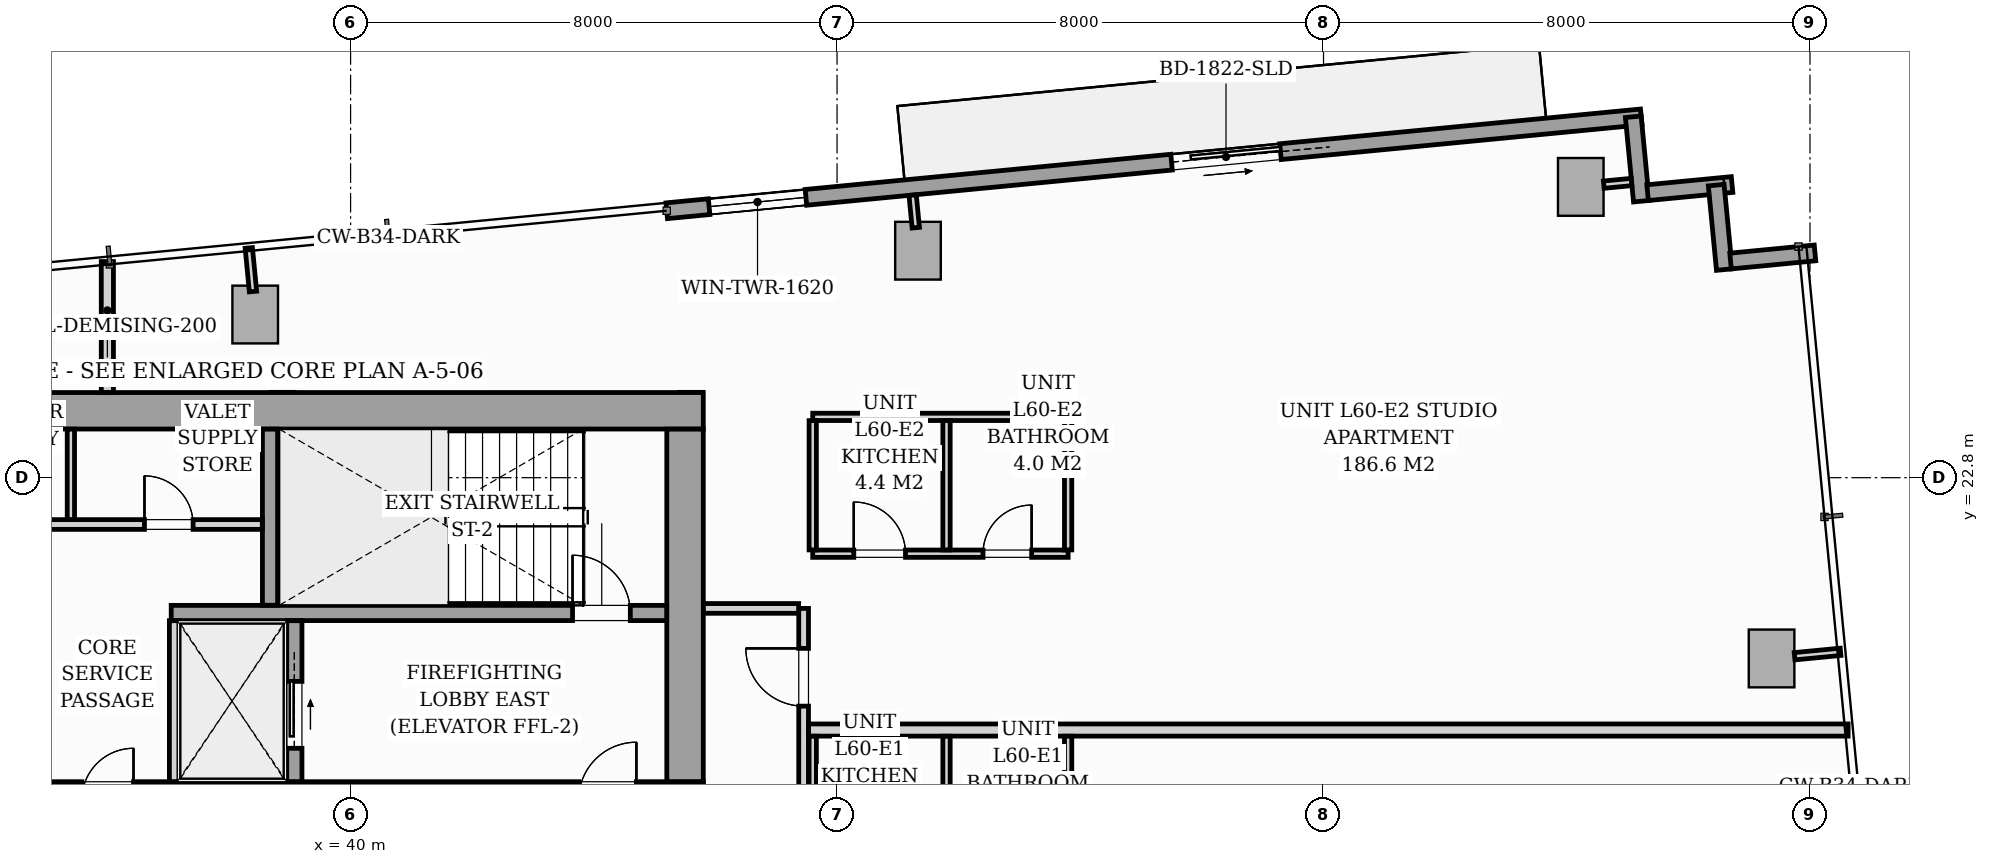
"""IFC4 building model, lengths in metres.
Left out: names, types, materials, properties, quantities, classifications, styles, units other than length and angle.
Written with IfcOpenShell. Run it as: python <this file> out.ifc"""

import sys

from ifc_helpers import new_model, si_unit, direction, frame, frame_2d, origin, origin_2d, place, context, subcontext, project, spatial, rectangle, i_section, extrude, source, transform, mapped, element, fill, save


model = new_model("IFC4")
c1 = context("Model", 3, precision=1e-05, world=origin(), true_north=direction((0.0, 1.0)))
c2 = subcontext(c1, "Body", "Model", "MODEL_VIEW")
j1 = project(units=[si_unit("LENGTHUNIT", "METRE"), si_unit("PLANEANGLEUNIT", "RADIAN")], contexts=[c1])
p1 = place(None, origin())
s1 = spatial("IfcSite", under=j1, at=p1, CompositionType="ELEMENT")
p2 = place(p1, origin())
s2 = spatial("IfcBuilding", under=s1, at=p2, CompositionType="ELEMENT")
p3 = place(p2, frame((0.0, 0.0, 208.2)))
s3 = spatial("IfcBuildingStorey", under=s2, at=p3, CompositionType="ELEMENT", Elevation=208.2)
m1 = source(origin(), c2, "Body", "SweptSolid", [
    extrude(i_section(OverallWidth=0.416, OverallDepth=0.446, WebThickness=0.039, FlangeThickness=0.063, FilletRadius=0.018, at=origin_2d()), origin(), (0.0, 0.0, 1.0), 3.196),
])
for number, where, z_axis, x_axis in (
    (1, (38.88, 24.0, 0.002), (0.0, 0.0, 1.0), (1.0, 0.0, 0.0)),
    (2, (45.6, 24.0, 0.002), (0.0, 0.0, 1.0), (1.0, 0.0, 0.0)),
):
    element("IfcColumn", number, at=place(p3, frame(where, z_axis=z_axis, x_axis=x_axis)), inside=s3, PredefinedType="PILASTER", context=c2, shape_type="MappedRepresentation", body=[
        mapped(m1, transform((0.0, 0.0, 0.0), scale=1.0)),
    ])
m2 = source(origin(), c2, "Body", "SweptSolid", [
    extrude(rectangle(XDim=0.75, YDim=0.95, at=origin_2d()), origin(), (0.0, 0.0, 1.0), 3.194),
])
for number, where, z_axis, x_axis in (
    (3, (38.431, 25.483, 0.002), (0.0, 0.0, 1.0), (0.995, 0.096, 0.0)),
    (4, (49.331, 26.533, 0.002), (0.0, 0.0, 1.0), (0.995, 0.096, 0.0)),
    (5, (60.23, 27.582, 0.002), (0.0, 0.0, 1.0), (0.995, 0.096, 0.0)),
    (6, (63.368, 19.827, 0.002), (0.0, 0.0, 1.0), (0.995, 0.096, 0.0)),
):
    element("IfcColumn", number, at=place(p3, frame(where, z_axis=z_axis, x_axis=x_axis)), inside=s3, PredefinedType="COLUMN", context=c2, shape_type="MappedRepresentation", body=[
        mapped(m2, transform((0.0, 0.0, 0.0), scale=1.0)),
    ])
p4 = place(p3, frame((45.199, 27.19, 0.0), z_axis=(0.0, 0.0, 1.0), x_axis=(0.995397074604, 0.095836652014, 0.0)))
e7 = element("IfcWall", 7, at=p4, inside=s3, PredefinedType="STANDARD", context=c2, shape_type="SweptSolid", body=[
    extrude(rectangle(XDim=16.1, YDim=0.26, at=frame_2d((8.05, 0.0))), origin(), (0.0, 0.0, 1.0), 2.9),
])
p5 = place(p4, frame((8.34, 0.0, 0.0)))
e8 = element("IfcOpeningElement", 8, at=p5, cuts=e7, PredefinedType="OPENING", context=c2, shape_type="SweptSolid", body=[
    extrude(rectangle(XDim=1.8, YDim=2.06, at=frame_2d((0.9, 1.03))), frame((0.0, 0.14, 0.0), z_axis=(0.0, -1.0, 0.0), x_axis=(1.0, 0.0, 0.0)), (0.0, 0.0, 1.0), 0.28),
])
p6 = place(p4, frame((0.7, 0.0, 0.65)))
e9 = element("IfcOpeningElement", 9, at=p6, cuts=e7, PredefinedType="OPENING", context=c2, shape_type="SweptSolid", body=[
    extrude(rectangle(XDim=1.6, YDim=1.5, at=frame_2d((0.8, 0.75))), frame((0.0, 0.14, 0.0), z_axis=(0.0, -1.0, 0.0), x_axis=(1.0, 0.0, 0.0)), (0.0, 0.0, 1.0), 0.28),
])
p7 = place(p3, frame((61.094, 28.735, 0.0), z_axis=(0.0, 0.0, 1.0), x_axis=(0.095742423056, -0.99540614245, 0.0)))
e10 = element("IfcWall", 10, at=p7, inside=s3, PredefinedType="STANDARD", context=c2, shape_type="SweptSolid", body=[
    extrude(rectangle(XDim=1.395, YDim=0.26, at=frame_2d((0.697, 0.0))), origin(), (0.0, 0.0, 1.0), 2.9),
])
p8 = place(p3, frame((61.33, 27.487, 0.0), z_axis=(0.0, 0.0, 1.0), x_axis=(0.995391056452, 0.09589913835, 0.0)))
e11 = element("IfcWall", 11, at=p8, inside=s3, PredefinedType="STANDARD", context=c2, shape_type="SweptSolid", body=[
    extrude(rectangle(XDim=1.395, YDim=0.26, at=frame_2d((0.698, 0.0))), origin(), (0.0, 0.0, 1.0), 2.9),
])
for number, where, z_axis, x_axis in (
    (12, (62.458, 27.611, 0.0), (0.0, 0.0, 1.0), (0.096, -0.995, 0.0)),
    (13, (62.694, 26.363, 0.0), (0.0, 0.0, 1.0), (0.995, 0.096, 0.0)),
):
    element("IfcWall", number, at=place(p3, frame(where, z_axis=z_axis, x_axis=x_axis)), inside=s3, PredefinedType="STANDARD", context=c2, shape_type="SweptSolid", body=[
        extrude(rectangle(XDim=1.395, YDim=0.26, at=frame_2d((0.697, 0.0))), origin(), (0.0, 0.0, 1.0), 2.9),
    ])
p9 = place(p3, frame((26.2, 17.5, 0.0), z_axis=(0.0, 0.0, 1.0), x_axis=(1.0, 0.0, 0.0)))
e14 = element("IfcWall", 14, at=p9, inside=s3, PredefinedType="SHEAR", context=c2, shape_type="SweptSolid", body=[
    extrude(rectangle(XDim=19.6, YDim=0.6, at=frame_2d((9.8, 0.0))), origin(), (0.0, 0.0, 1.0), 3.2),
])
p10 = place(p9, frame((0.95, 0.0, 0.0)))
e15 = element("IfcOpeningElement", 15, at=p10, cuts=e14, PredefinedType="OPENING", context=c2, shape_type="SweptSolid", body=[
    extrude(rectangle(XDim=0.95, YDim=2.06, at=frame_2d((0.475, 1.03))), frame((0.0, 0.31, 0.0), z_axis=(0.0, -1.0, 0.0), x_axis=(1.0, 0.0, 0.0)), (0.0, 0.0, 1.0), 0.62),
])
p11 = place(p9, frame((9.38, 0.0, 0.0)))
e16 = element("IfcOpeningElement", 16, at=p11, cuts=e14, PredefinedType="OPENING", context=c2, shape_type="SweptSolid", body=[
    extrude(rectangle(XDim=0.85, YDim=2.0, at=frame_2d((0.425, 1.0))), frame((0.0, 0.31, 0.0), z_axis=(0.0, -1.0, 0.0), x_axis=(1.0, 0.0, 0.0)), (0.0, 0.0, 1.0), 0.62),
])
p12 = place(p9, frame((17.55, 0.0, 0.0)))
e17 = element("IfcOpeningElement", 17, at=p12, cuts=e14, PredefinedType="OPENING", context=c2, shape_type="SweptSolid", body=[
    extrude(rectangle(XDim=0.95, YDim=2.06, at=frame_2d((0.475, 1.03))), frame((0.0, 0.31, 0.0), z_axis=(0.0, -1.0, 0.0), x_axis=(1.0, 0.0, 0.0)), (0.0, 0.0, 1.0), 0.62),
])
p13 = place(p3, frame((26.2, 23.9, 0.0), z_axis=(0.0, 0.0, 1.0), x_axis=(1.0, 0.0, 0.0)))
e18 = element("IfcWall", 18, at=p13, inside=s3, PredefinedType="SHEAR", context=c2, shape_type="SweptSolid", body=[
    extrude(rectangle(XDim=19.6, YDim=0.6, at=frame_2d((9.8, 0.0))), origin(), (0.0, 0.0, 1.0), 3.2),
])
p14 = place(p3, frame((45.5, 17.802, 0.0), z_axis=(0.0, 0.0, 1.0), x_axis=(0.0, 1.0, 0.0)))
e19 = element("IfcWall", 19, at=p14, inside=s3, PredefinedType="SHEAR", context=c2, shape_type="SweptSolid", body=[
    extrude(rectangle(XDim=5.796, YDim=0.6, at=frame_2d((2.898, 0.0))), origin(), (0.0, 0.0, 1.0), 3.2),
])
p15 = place(p3, frame((37.05, 20.575, 0.0), z_axis=(0.0, 0.0, 1.0), x_axis=(1.0, 0.0, 0.0)))
e20 = element("IfcWall", 20, at=p15, inside=s3, PredefinedType="SOLIDWALL", context=c2, shape_type="SweptSolid", body=[
    extrude(rectangle(XDim=8.148, YDim=0.25, at=frame_2d((4.074, 0.0))), origin(), (0.0, 0.0, 1.0), 3.2),
])
p16 = place(p15, frame((6.6, 0.0, 0.0)))
e21 = element("IfcOpeningElement", 21, at=p16, cuts=e20, PredefinedType="OPENING", context=c2, shape_type="SweptSolid", body=[
    extrude(rectangle(XDim=0.95, YDim=2.06, at=frame_2d((0.475, 1.03))), frame((0.0, 0.135, 0.0), z_axis=(0.0, -1.0, 0.0), x_axis=(1.0, 0.0, 0.0)), (0.0, 0.0, 1.0), 0.27),
])
p17 = place(p3, frame((38.675, 20.702, 0.0), z_axis=(0.0, 0.0, 1.0), x_axis=(0.0, 1.0, 0.0)))
e22 = element("IfcWall", 22, at=p17, inside=s3, PredefinedType="SOLIDWALL", context=c2, shape_type="SweptSolid", body=[
    extrude(rectangle(XDim=2.896, YDim=0.25, at=frame_2d((1.448, 0.0))), origin(), (0.0, 0.0, 1.0), 3.2),
])
p18 = place(p3, frame((37.1, 17.802, 0.0), z_axis=(0.0, 0.0, 1.0), x_axis=(0.0, 1.0, 0.0)))
e23 = element("IfcWall", 23, at=p18, inside=s3, PredefinedType="PARTITIONING", context=c2, shape_type="SweptSolid", body=[
    extrude(rectangle(XDim=2.646, YDim=0.16, at=frame_2d((1.323, 0.0))), origin(), (0.0, 0.0, 1.0), 2.9),
])
p19 = place(p3, frame((39.075, 17.802, 0.0), z_axis=(0.0, 0.0, 1.0), x_axis=(0.0, 1.0, 0.0)))
e24 = element("IfcWall", 24, at=p19, inside=s3, PredefinedType="SOLIDWALL", context=c2, shape_type="SweptSolid", body=[
    extrude(rectangle(XDim=2.646, YDim=0.25, at=frame_2d((1.323, 0.0))), origin(), (0.0, 0.0, 1.0), 3.2),
])
p20 = place(p19, frame((0.548, 0.0, 0.0)))
e25 = element("IfcOpeningElement", 25, at=p20, cuts=e24, PredefinedType="OPENING", context=c2, shape_type="SweptSolid", body=[
    extrude(rectangle(XDim=1.1, YDim=2.08, at=frame_2d((0.55, 1.04))), frame((0.0, 0.135, 0.0), z_axis=(0.0, -1.0, 0.0), x_axis=(1.0, 0.0, 0.0)), (0.0, 0.0, 1.0), 0.27),
])
p21 = place(p3, frame((33.452, 22.03, 0.0), z_axis=(0.0, 0.0, 1.0), x_axis=(1.0, 0.0, 0.0)))
e26 = element("IfcWall", 26, at=p21, inside=s3, PredefinedType="PARTITIONING", context=c2, shape_type="SweptSolid", body=[
    extrude(rectangle(XDim=5.096, YDim=0.16, at=frame_2d((2.548, 0.0))), origin(), (0.0, 0.0, 1.0), 2.9),
])
p22 = place(p21, frame((0.538, 0.0, 0.0)))
e27 = element("IfcOpeningElement", 27, at=p22, cuts=e26, PredefinedType="OPENING", context=c2, shape_type="SweptSolid", body=[
    extrude(rectangle(XDim=0.8, YDim=2.05, at=frame_2d((0.4, 1.025))), frame((0.0, 0.09, 0.0), z_axis=(0.0, -1.0, 0.0), x_axis=(1.0, 0.0, 0.0)), (0.0, 0.0, 1.0), 0.18),
])
p23 = place(p21, frame((3.158, 0.0, 0.0)))
e28 = element("IfcOpeningElement", 28, at=p23, cuts=e26, PredefinedType="OPENING", context=c2, shape_type="SweptSolid", body=[
    extrude(rectangle(XDim=0.8, YDim=2.05, at=frame_2d((0.4, 1.025))), frame((0.0, 0.09, 0.0), z_axis=(0.0, -1.0, 0.0), x_axis=(1.0, 0.0, 0.0)), (0.0, 0.0, 1.0), 0.18),
])
p24 = place(p3, frame((35.4, 22.112, 0.0), z_axis=(0.0, 0.0, 1.0), x_axis=(0.0, 1.0, 0.0)))
e29 = element("IfcWall", 29, at=p24, inside=s3, PredefinedType="PARTITIONING", context=c2, shape_type="SweptSolid", body=[
    extrude(rectangle(XDim=1.486, YDim=0.12, at=frame_2d((0.743, 0.0))), origin(), (0.0, 0.0, 1.0), 2.9),
])
p25 = place(p3, frame((47.45, 13.362, 0.0), z_axis=(0.0, 0.0, 1.0), x_axis=(0.0, 1.0, 0.0)))
e30 = element("IfcWall", 30, at=p25, inside=s3, PredefinedType="PARTITIONING", context=c2, shape_type="SweptSolid", body=[
    extrude(rectangle(XDim=7.288, YDim=0.16, at=frame_2d((3.644, 0.0))), origin(), (0.0, 0.0, 1.0), 2.9),
])
p26 = place(p25, frame((0.493, 0.0, 0.0)))
e31 = element("IfcOpeningElement", 31, at=p26, cuts=e30, PredefinedType="OPENING", context=c2, shape_type="SweptSolid", body=[
    extrude(rectangle(XDim=0.85, YDim=2.0, at=frame_2d((0.425, 1.0))), frame((0.0, 0.09, 0.0), z_axis=(0.0, -1.0, 0.0), x_axis=(1.0, 0.0, 0.0)), (0.0, 0.0, 1.0), 0.18),
])
p27 = place(p25, frame((5.681, 0.0, 0.0)))
e32 = element("IfcOpeningElement", 32, at=p27, cuts=e30, PredefinedType="OPENING", context=c2, shape_type="SweptSolid", body=[
    extrude(rectangle(XDim=0.95, YDim=2.06, at=frame_2d((0.475, 1.03))), frame((0.0, 0.09, 0.0), z_axis=(0.0, -1.0, 0.0), x_axis=(1.0, 0.0, 0.0)), (0.0, 0.0, 1.0), 0.18),
])
p28 = place(p3, frame((36.0, 24.202, 0.0), z_axis=(0.0, 0.0, 1.0), x_axis=(0.0, 1.0, 0.0)))
e33 = element("IfcWall", 33, at=p28, inside=s3, PredefinedType="PARTITIONING", context=c2, shape_type="SweptSolid", body=[
    extrude(rectangle(XDim=2.152, YDim=0.2, at=frame_2d((1.076, 0.0))), origin(), (0.0, 0.0, 1.0), 2.9),
])
p29 = place(p3, frame((45.802, 20.65, 0.0), z_axis=(0.0, 0.0, 1.0), x_axis=(1.0, 0.0, 0.0)))
e34 = element("IfcWall", 34, at=p29, inside=s3, PredefinedType="PARTITIONING", context=c2, shape_type="SweptSolid", body=[
    extrude(rectangle(XDim=1.566, YDim=0.16, at=frame_2d((0.783, 0.0))), origin(), (0.0, 0.0, 1.0), 2.9),
])
p30 = place(p3, frame((47.532, 18.65, 0.0), z_axis=(0.0, 0.0, 1.0), x_axis=(1.0, 0.0, 0.0)))
e35 = element("IfcWall", 35, at=p30, inside=s3, PredefinedType="PARTITIONING", context=c2, shape_type="SweptSolid", body=[
    extrude(rectangle(XDim=17.095, YDim=0.2, at=frame_2d((8.547, 0.0))), origin(), (0.0, 0.0, 1.0), 2.241),
])
for number, where, z_axis, x_axis in (
    (36, (47.6, 16.362, 0.0), (0.0, 0.0, 1.0), (0.0, 1.0, 0.0)),
    (37, (49.8, 16.362, 0.0), (0.0, 0.0, 1.0), (0.0, 1.0, 0.0)),
    (38, (51.8, 16.362, 0.0), (0.0, 0.0, 1.0), (0.0, 1.0, 0.0)),
):
    element("IfcWall", number, at=place(p3, frame(where, z_axis=z_axis, x_axis=x_axis)), inside=s3, PredefinedType="PARTITIONING", context=c2, shape_type="SweptSolid", body=[
        extrude(rectangle(XDim=2.186, YDim=0.12, at=frame_2d((1.093, 0.0))), origin(), (0.0, 0.0, 1.0), 2.9),
    ])
p31 = place(p3, frame((47.6, 21.55, 0.0), z_axis=(0.0, 0.0, 1.0), x_axis=(1.0, 0.0, 0.0)))
e39 = element("IfcWall", 39, at=p31, inside=s3, PredefinedType="PARTITIONING", context=c2, shape_type="SweptSolid", body=[
    extrude(rectangle(XDim=4.2, YDim=0.12, at=frame_2d((2.1, 0.0))), origin(), (0.0, 0.0, 1.0), 2.9),
])
p32 = place(p31, frame((0.675, 0.0, 0.0)))
e40 = element("IfcOpeningElement", 40, at=p32, cuts=e39, PredefinedType="OPENING", context=c2, shape_type="SweptSolid", body=[
    extrude(rectangle(XDim=0.85, YDim=2.05, at=frame_2d((0.425, 1.025))), frame((0.0, 0.07, 0.0), z_axis=(0.0, -1.0, 0.0), x_axis=(1.0, 0.0, 0.0)), (0.0, 0.0, 1.0), 0.14),
])
p33 = place(p31, frame((2.8, 0.0, 0.0)))
e41 = element("IfcOpeningElement", 41, at=p33, cuts=e39, PredefinedType="OPENING", context=c2, shape_type="SweptSolid", body=[
    extrude(rectangle(XDim=0.8, YDim=2.0, at=frame_2d((0.4, 1.0))), frame((0.0, 0.07, 0.0), z_axis=(0.0, -1.0, 0.0), x_axis=(1.0, 0.0, 0.0)), (0.0, 0.0, 1.0), 0.14),
])
p34 = place(p3, frame((47.6, 23.8, 0.0), z_axis=(0.0, 0.0, 1.0), x_axis=(1.0, 0.0, 0.0)))
e42 = element("IfcWall", 42, at=p34, inside=s3, PredefinedType="PARTITIONING", context=c2, shape_type="SweptSolid", body=[
    extrude(rectangle(XDim=4.2, YDim=0.12, at=frame_2d((2.1, 0.0))), origin(), (0.0, 0.0, 1.0), 2.9),
])
for number, where, z_axis, x_axis in (
    (43, (47.6, 21.612, 0.0), (0.0, 0.0, 1.0), (0.0, 1.0, 0.0)),
    (44, (49.8, 21.612, 0.0), (0.0, 0.0, 1.0), (0.0, 1.0, 0.0)),
    (45, (51.8, 21.612, 0.0), (0.0, 0.0, 1.0), (0.0, 1.0, 0.0)),
):
    element("IfcWall", number, at=place(p3, frame(where, z_axis=z_axis, x_axis=x_axis)), inside=s3, PredefinedType="PARTITIONING", context=c2, shape_type="SweptSolid", body=[
        extrude(rectangle(XDim=2.126, YDim=0.12, at=frame_2d((1.063, 0.0))), origin(), (0.0, 0.0, 1.0), 2.9),
    ])
p35 = place(p3, frame((38.395, 25.861, 0.0), z_axis=(0.0, 0.0, 1.0), x_axis=(-0.095977354523, 0.995383517755, 0.0)))
e46 = element("IfcWall", 46, at=p35, inside=s3, PredefinedType="PARTITIONING", context=c2, shape_type="SweptSolid", body=[
    extrude(rectangle(XDim=0.72, YDim=0.12, at=frame_2d((0.36, 0.0))), origin(), (0.0, 0.0, 1.0), 2.9),
])
p36 = place(p3, frame((49.294, 26.911, 0.0), z_axis=(0.0, 0.0, 1.0), x_axis=(-0.095772948675, 0.995403205893, 0.0)))
e47 = element("IfcWall", 47, at=p36, inside=s3, PredefinedType="PARTITIONING", context=c2, shape_type="SweptSolid", body=[
    extrude(rectangle(XDim=0.538, YDim=0.12, at=frame_2d((0.269, 0.0))), origin(), (0.0, 0.0, 1.0), 2.9),
])
p37 = place(p3, frame((60.609, 27.618, 0.0), z_axis=(0.0, 0.0, 1.0), x_axis=(0.995384576284, 0.09596637586, 0.0)))
e48 = element("IfcWall", 48, at=p37, inside=s3, PredefinedType="PARTITIONING", context=c2, shape_type="SweptSolid", body=[
    extrude(rectangle(XDim=0.458, YDim=0.12, at=frame_2d((0.229, 0.0))), origin(), (0.0, 0.0, 1.0), 2.9),
])
p38 = place(p3, frame((63.747, 19.864, 0.0), z_axis=(0.0, 0.0, 1.0), x_axis=(0.995405496295, 0.095749140702, 0.0)))
e49 = element("IfcWall", 49, at=p38, inside=s3, PredefinedType="PARTITIONING", context=c2, shape_type="SweptSolid", body=[
    extrude(rectangle(XDim=0.76, YDim=0.12, at=frame_2d((0.38, 0.0))), origin(), (0.0, 0.0, 1.0), 2.9),
])
m3 = source(origin(), c2, "Body", "SweptSolid", [
    extrude(rectangle(XDim=1.8, YDim=2.06, at=frame_2d((0.9, 1.03))), frame((0.0, 0.025, 0.0), z_axis=(0.0, -1.0, 0.0), x_axis=(1.0, 0.0, 0.0)), (0.0, 0.0, 1.0), 0.05),
])
p39 = place(p5, origin())
e50 = element("IfcDoor", 50, at=p39, inside=s3, OperationType="SLIDING_TO_RIGHT", PredefinedType="DOOR", context=c2, shape_type="MappedRepresentation", body=[
    mapped(m3, transform((0.0, 0.0, 0.0), scale=1.0)),
])
fill(e8, e50)
m4 = source(origin(), c2, "Body", "SweptSolid", [
    extrude(rectangle(XDim=1.6, YDim=1.5, at=frame_2d((0.8, 0.75))), frame((0.0, 0.03, 0.0), z_axis=(0.0, -1.0, 0.0), x_axis=(1.0, 0.0, 0.0)), (0.0, 0.0, 1.0), 0.06),
])
p40 = place(p6, origin())
e51 = element("IfcWindow", 51, at=p40, inside=s3, PartitioningType="SINGLE_PANEL", PredefinedType="WINDOW", context=c2, shape_type="MappedRepresentation", body=[
    mapped(m4, transform((0.0, 0.0, 0.0), scale=1.0)),
])
fill(e9, e51)
m5 = source(origin(), c2, "Body", "SweptSolid", [
    extrude(rectangle(XDim=0.95, YDim=2.06, at=frame_2d((0.475, 1.03))), frame((0.0, 0.025, 0.0), z_axis=(0.0, -1.0, 0.0), x_axis=(1.0, 0.0, 0.0)), (0.0, 0.0, 1.0), 0.05),
])
p41 = place(p16, origin())
e52 = element("IfcDoor", 52, at=p41, inside=s3, OperationType="SINGLE_SWING_LEFT", PredefinedType="DOOR", context=c2, shape_type="MappedRepresentation", body=[
    mapped(m5, transform((0.0, 0.0, 0.0), scale=1.0)),
])
fill(e21, e52)
m6 = source(origin(), c2, "Body", "SweptSolid", [
    extrude(rectangle(XDim=1.1, YDim=2.08, at=frame_2d((0.55, 1.04))), frame((0.0, 0.025, 0.0), z_axis=(0.0, -1.0, 0.0), x_axis=(1.0, 0.0, 0.0)), (0.0, 0.0, 1.0), 0.05),
])
p42 = place(p20, origin())
e53 = element("IfcDoor", 53, at=p42, inside=s3, OperationType="SLIDING_TO_RIGHT", PredefinedType="DOOR", context=c2, shape_type="MappedRepresentation", body=[
    mapped(m6, transform((0.0, 0.0, 0.0), scale=1.0)),
])
fill(e25, e53)
m7 = source(origin(), c2, "Body", "SweptSolid", [
    extrude(rectangle(XDim=0.8, YDim=2.05, at=frame_2d((0.4, 1.025))), frame((0.0, 0.025, 0.0), z_axis=(0.0, -1.0, 0.0), x_axis=(1.0, 0.0, 0.0)), (0.0, 0.0, 1.0), 0.05),
])
p43 = place(p23, origin())
e54 = element("IfcDoor", 54, at=p43, inside=s3, OperationType="SINGLE_SWING_LEFT", PredefinedType="DOOR", context=c2, shape_type="MappedRepresentation", body=[
    mapped(m7, transform((0.0, 0.0, 0.0), scale=1.0)),
])
fill(e28, e54)
m8 = source(origin(), c2, "Body", "SweptSolid", [
    extrude(rectangle(XDim=0.95, YDim=2.06, at=frame_2d((0.475, 1.03))), frame((0.0, 0.025, 0.0), z_axis=(0.0, -1.0, 0.0), x_axis=(1.0, 0.0, 0.0)), (0.0, 0.0, 1.0), 0.05),
])
p44 = place(p27, origin())
e55 = element("IfcDoor", 55, at=p44, inside=s3, OperationType="SINGLE_SWING_RIGHT", PredefinedType="DOOR", context=c2, shape_type="MappedRepresentation", body=[
    mapped(m8, transform((0.0, 0.0, 0.0), scale=1.0)),
])
fill(e32, e55)
m9 = source(origin(), c2, "Body", "SweptSolid", [
    extrude(rectangle(XDim=0.85, YDim=2.05, at=frame_2d((0.425, 1.025))), frame((0.0, 0.025, 0.0), z_axis=(0.0, -1.0, 0.0), x_axis=(1.0, 0.0, 0.0)), (0.0, 0.0, 1.0), 0.05),
])
p45 = place(p32, origin())
e56 = element("IfcDoor", 56, at=p45, inside=s3, OperationType="SINGLE_SWING_LEFT", PredefinedType="DOOR", context=c2, shape_type="MappedRepresentation", body=[
    mapped(m9, transform((0.0, 0.0, 0.0), scale=1.0)),
])
fill(e40, e56)
m10 = source(origin(), c2, "Body", "SweptSolid", [
    extrude(rectangle(XDim=0.8, YDim=2.0, at=frame_2d((0.4, 1.0))), frame((0.0, 0.025, 0.0), z_axis=(0.0, -1.0, 0.0), x_axis=(1.0, 0.0, 0.0)), (0.0, 0.0, 1.0), 0.05),
])
p46 = place(p33, origin())
e57 = element("IfcDoor", 57, at=p46, inside=s3, OperationType="SINGLE_SWING_RIGHT", PredefinedType="DOOR", context=c2, shape_type="MappedRepresentation", body=[
    mapped(m10, transform((0.0, 0.0, 0.0), scale=1.0)),
])
fill(e41, e57)
save(model, sys.argv[1])
